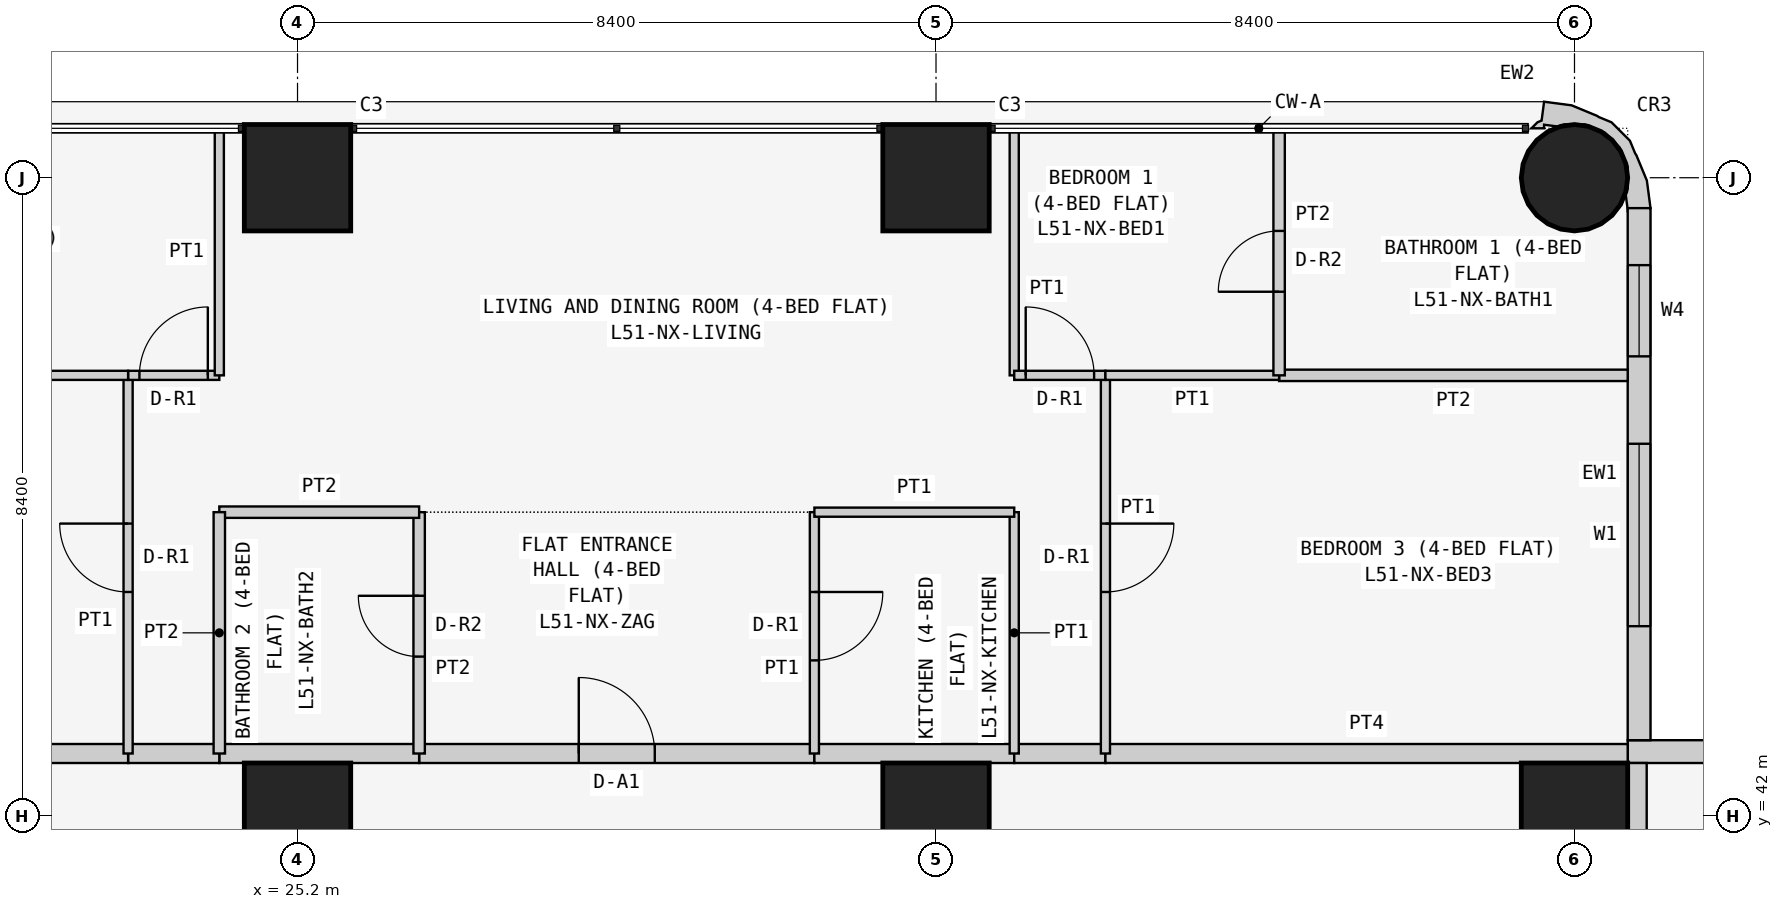
"""IFC4 building model, lengths in metres.
Left out: names, types, materials, properties, quantities, classifications, styles, units other than length and angle.
Written with IfcOpenShell. Run it as: python <this file> out.ifc"""

import sys

from ifc_helpers import new_model, si_unit, direction, frame, frame_2d, origin, origin_2d, place, context, subcontext, project, spatial, polyline, rectangle, circle, outline, extrude, element, fill, save


model = new_model("IFC4")
c1 = context("Model", 3, precision=1e-05, world=origin(), true_north=direction((0.0, 1.0)))
c2 = subcontext(c1, "Body", "Model", "MODEL_VIEW")
j1 = project(units=[si_unit("LENGTHUNIT", "METRE"), si_unit("PLANEANGLEUNIT", "RADIAN")], contexts=[c1])
p1 = place(None, origin())
s1 = spatial("IfcSite", under=j1, at=p1, CompositionType="ELEMENT")
p2 = place(p1, origin())
s2 = spatial("IfcBuilding", under=s1, at=p2, CompositionType="ELEMENT")
p3 = place(p2, frame((0.0, 0.0, 197.7)))
s3 = spatial("IfcBuildingStorey", under=s2, at=p3, CompositionType="ELEMENT", Elevation=197.7)
for number, where, z_axis, x_axis in (
    (1, (25.2, 42.0, 0.0), (0.0, 0.0, 1.0), (1.0, 0.0, 0.0)),
    (2, (25.2, 50.4, 0.0), (0.0, 0.0, 1.0), (1.0, 0.0, 0.0)),
    (3, (33.6, 42.0, 0.0), (0.0, 0.0, 1.0), (1.0, 0.0, 0.0)),
    (4, (33.6, 50.4, 0.0), (0.0, 0.0, 1.0), (1.0, 0.0, 0.0)),
    (5, (42.0, 42.0, 0.0), (0.0, 0.0, 1.0), (1.0, 0.0, 0.0)),
):
    element("IfcColumn", number, at=place(p3, frame(where, z_axis=z_axis, x_axis=x_axis)), inside=s3, PredefinedType="COLUMN", context=c2, shape_type="SweptSolid", body=[
        extrude(rectangle(XDim=1.4, YDim=1.4, at=origin_2d()), origin(), (0.0, 0.0, 1.0), 3.6),
    ])
p4 = place(p3, frame((42.0, 50.4, 0.0), z_axis=(0.0, 0.0, 1.0), x_axis=(1.0, 0.0, 0.0)))
e6 = element("IfcColumn", 6, at=p4, inside=s3, PredefinedType="COLUMN", context=c2, shape_type="SweptSolid", body=[
    extrude(circle(Radius=0.7, at=origin_2d()), origin(), (0.0, 0.0, 1.0), 3.6),
])
p5 = place(p3, frame((50.0, 42.85, 0.0), z_axis=(0.0, 0.0, 1.0), x_axis=(-1.0, 0.0, 0.0)))
e7 = element("IfcWall", 7, at=p5, inside=s3, PredefinedType="SOLIDWALL", context=c2, shape_type="SweptSolid", body=[
    extrude(rectangle(XDim=7.3, YDim=0.3, at=frame_2d((3.65, 0.0))), origin(), (0.0, 0.0, 1.0), 3.45),
])
p6 = place(p5, frame((3.1, 0.0, 0.9)))
e8 = element("IfcOpeningElement", 8, at=p6, cuts=e7, PredefinedType="OPENING", context=c2, shape_type="SweptSolid", body=[
    extrude(rectangle(XDim=2.4, YDim=1.5, at=frame_2d((1.2, 0.75))), frame((0.0, 0.16, 0.0), z_axis=(0.0, -1.0, 0.0), x_axis=(1.0, 0.0, 0.0)), (0.0, 0.0, 1.0), 0.32),
])
p7 = place(p5, frame((0.75, 0.0, 0.9)))
e9 = element("IfcOpeningElement", 9, at=p7, cuts=e7, PredefinedType="OPENING", context=c2, shape_type="SweptSolid", body=[
    extrude(rectangle(XDim=1.2, YDim=1.5, at=frame_2d((0.6, 0.75))), frame((0.0, 0.16, 0.0), z_axis=(0.0, -1.0, 0.0), x_axis=(1.0, 0.0, 0.0)), (0.0, 0.0, 1.0), 0.32),
])
p8 = place(p3, frame((42.85, 43.0, 0.0), z_axis=(0.0, 0.0, 1.0), x_axis=(0.0, 1.0, 0.0)))
e10 = element("IfcWall", 10, at=p8, inside=s3, PredefinedType="SOLIDWALL", context=c2, shape_type="SweptSolid", body=[
    extrude(rectangle(XDim=7.0, YDim=0.3, at=frame_2d((3.5, 0.0))), origin(), (0.0, 0.0, 1.0), 3.45),
])
p9 = place(p8, frame((1.5, 0.0, 0.9)))
e11 = element("IfcOpeningElement", 11, at=p9, cuts=e10, PredefinedType="OPENING", context=c2, shape_type="SweptSolid", body=[
    extrude(rectangle(XDim=2.4, YDim=1.5, at=frame_2d((1.2, 0.75))), frame((0.0, 0.16, 0.0), z_axis=(0.0, -1.0, 0.0), x_axis=(1.0, 0.0, 0.0)), (0.0, 0.0, 1.0), 0.32),
])
p10 = place(p8, frame((5.05, 0.0, 0.9)))
e12 = element("IfcOpeningElement", 12, at=p10, cuts=e10, PredefinedType="OPENING", context=c2, shape_type="SweptSolid", body=[
    extrude(rectangle(XDim=1.2, YDim=1.5, at=frame_2d((0.6, 0.75))), frame((0.0, 0.16, 0.0), z_axis=(0.0, -1.0, 0.0), x_axis=(1.0, 0.0, 0.0)), (0.0, 0.0, 1.0), 0.32),
])
p11 = place(p3, frame((42.724, 50.11, 0.0), z_axis=(0.0, 0.0, 1.0), x_axis=(0.439933741929, 0.898030234854, 0.0)))
e13 = element("IfcWall", 13, at=p11, inside=s3, PredefinedType="SOLIDWALL", context=c2, shape_type="SweptSolid", body=[
    extrude(outline(polyline([(-0.145, -0.044), (0.022, -0.296), (0.327, -0.094), (0.568, 0.18), (0.577, 0.199), (0.7, 0.337), (0.811, 0.661), (0.799, 0.845), (0.803, 0.866), (0.78, 1.231), (0.664, 1.577), (0.426, 1.497), (0.382, 1.536), (0.276, 1.572), (0.349, 1.423), (0.392, 1.444), (0.453, 1.261), (0.51, 1.211), (0.632, 0.961), (0.65, 0.683), (0.56, 0.419), (0.375, 0.21), (0.125, 0.087), (0.05, 0.082), (-0.127, -0.035), (-0.145, -0.044)])), origin(), (0.0, 0.0, 1.0), 3.45),
])
p12 = place(p3, frame((26.8, 42.825, 0.0), z_axis=(0.0, 0.0, 1.0), x_axis=(1.0, 0.0, 0.0)))
e14 = element("IfcWall", 14, at=p12, inside=s3, PredefinedType="PARTITIONING", context=c2, shape_type="SweptSolid", body=[
    extrude(rectangle(XDim=5.2, YDim=0.25, at=frame_2d((2.6, 0.0))), origin(), (0.0, 0.0, 1.0), 3.45),
])
p13 = place(p12, frame((2.1, 0.0, 0.0)))
e15 = element("IfcOpeningElement", 15, at=p13, cuts=e14, PredefinedType="OPENING", context=c2, shape_type="SweptSolid", body=[
    extrude(rectangle(XDim=1.0, YDim=2.1, at=frame_2d((0.5, 1.05))), frame((0.0, 0.135, 0.0), z_axis=(0.0, -1.0, 0.0), x_axis=(1.0, 0.0, 0.0)), (0.0, 0.0, 1.0), 0.27),
])
p14 = place(p3, frame((24.171, 42.825, 0.0), z_axis=(0.0, 0.0, 1.0), x_axis=(1.0, 0.0, 0.0)))
e16 = element("IfcWall", 16, at=p14, inside=s3, PredefinedType="PARTITIONING", context=c2, shape_type="SweptSolid", body=[
    extrude(rectangle(XDim=2.629, YDim=0.25, at=frame_2d((1.314, 0.0))), origin(), (0.0, 0.0, 1.0), 3.45),
])
p15 = place(p3, frame((32.0, 42.825, 0.0), z_axis=(0.0, 0.0, 1.0), x_axis=(1.0, 0.0, 0.0)))
e17 = element("IfcWall", 17, at=p15, inside=s3, PredefinedType="PARTITIONING", context=c2, shape_type="SweptSolid", body=[
    extrude(rectangle(XDim=2.629, YDim=0.25, at=frame_2d((1.314, 0.0))), origin(), (0.0, 0.0, 1.0), 3.45),
])
p16 = place(p3, frame((22.971, 42.825, 0.0), z_axis=(0.0, 0.0, 1.0), x_axis=(1.0, 0.0, 0.0)))
e18 = element("IfcWall", 18, at=p16, inside=s3, PredefinedType="PARTITIONING", context=c2, shape_type="SweptSolid", body=[
    extrude(rectangle(XDim=1.2, YDim=0.25, at=frame_2d((0.6, 0.0))), origin(), (0.0, 0.0, 1.0), 3.45),
])
p17 = place(p3, frame((34.629, 42.825, 0.0), z_axis=(0.0, 0.0, 1.0), x_axis=(1.0, 0.0, 0.0)))
e19 = element("IfcWall", 19, at=p17, inside=s3, PredefinedType="PARTITIONING", context=c2, shape_type="SweptSolid", body=[
    extrude(rectangle(XDim=1.2, YDim=0.25, at=frame_2d((0.6, 0.0))), origin(), (0.0, 0.0, 1.0), 3.45),
])
for number, where, z_axis, x_axis in (
    (20, (16.1, 42.825, 0.0), (0.0, 0.0, 1.0), (1.0, 0.0, 0.0)),
    (21, (35.829, 42.825, 0.0), (0.0, 0.0, 1.0), (1.0, 0.0, 0.0)),
    (22, (42.825, 42.7, 0.0), (0.0, 0.0, 1.0), (0.0, -1.0, 0.0)),
):
    element("IfcWall", number, at=place(p3, frame(where, z_axis=z_axis, x_axis=x_axis)), inside=s3, PredefinedType="PARTITIONING", context=c2, shape_type="SweptSolid", body=[
        extrude(rectangle(XDim=6.871, YDim=0.25, at=frame_2d((3.436, 0.0))), origin(), (0.0, 0.0, 1.0), 3.45),
    ])
p18 = place(p3, frame((26.8, 46.0, 0.0), z_axis=(0.0, 0.0, 1.0), x_axis=(0.0, -1.0, 0.0)))
e23 = element("IfcWall", 23, at=p18, inside=s3, PredefinedType="PARTITIONING", context=c2, shape_type="SweptSolid", body=[
    extrude(rectangle(XDim=3.175, YDim=0.15, at=frame_2d((1.587, 0.0))), origin(), (0.0, 0.0, 1.0), 3.45),
])
p19 = place(p18, frame((1.1, 0.0, 0.0)))
e24 = element("IfcOpeningElement", 24, at=p19, cuts=e23, PredefinedType="OPENING", context=c2, shape_type="SweptSolid", body=[
    extrude(rectangle(XDim=0.8, YDim=2.1, at=frame_2d((0.4, 1.05))), frame((0.0, 0.085, 0.0), z_axis=(0.0, -1.0, 0.0), x_axis=(1.0, 0.0, 0.0)), (0.0, 0.0, 1.0), 0.17),
])
p20 = place(p3, frame((32.0, 42.825, 0.0), z_axis=(0.0, 0.0, 1.0), x_axis=(0.0, 1.0, 0.0)))
e25 = element("IfcWall", 25, at=p20, inside=s3, PredefinedType="PARTITIONING", context=c2, shape_type="SweptSolid", body=[
    extrude(rectangle(XDim=3.175, YDim=0.12, at=frame_2d((1.587, 0.0))), origin(), (0.0, 0.0, 1.0), 3.45),
])
p21 = place(p20, frame((1.225, 0.0, 0.0)))
e26 = element("IfcOpeningElement", 26, at=p21, cuts=e25, PredefinedType="OPENING", context=c2, shape_type="SweptSolid", body=[
    extrude(rectangle(XDim=0.9, YDim=2.1, at=frame_2d((0.45, 1.05))), frame((0.0, 0.07, 0.0), z_axis=(0.0, -1.0, 0.0), x_axis=(1.0, 0.0, 0.0)), (0.0, 0.0, 1.0), 0.14),
])
p22 = place(p3, frame((26.8, 46.0, 0.0), z_axis=(0.0, 0.0, 1.0), x_axis=(-1.0, 0.0, 0.0)))
e27 = element("IfcWall", 27, at=p22, inside=s3, PredefinedType="PARTITIONING", context=c2, shape_type="SweptSolid", body=[
    extrude(rectangle(XDim=2.629, YDim=0.15, at=frame_2d((1.314, 0.0))), origin(), (0.0, 0.0, 1.0), 3.45),
])
p23 = place(p3, frame((24.171, 46.0, 0.0), z_axis=(0.0, 0.0, 1.0), x_axis=(0.0, -1.0, 0.0)))
e28 = element("IfcWall", 28, at=p23, inside=s3, PredefinedType="PARTITIONING", context=c2, shape_type="SweptSolid", body=[
    extrude(rectangle(XDim=3.175, YDim=0.15, at=frame_2d((1.587, 0.0))), origin(), (0.0, 0.0, 1.0), 3.45),
])
p24 = place(p3, frame((34.629, 42.825, 0.0), z_axis=(0.0, 0.0, 1.0), x_axis=(0.0, 1.0, 0.0)))
e29 = element("IfcWall", 29, at=p24, inside=s3, PredefinedType="PARTITIONING", context=c2, shape_type="SweptSolid", body=[
    extrude(rectangle(XDim=3.175, YDim=0.12, at=frame_2d((1.587, 0.0))), origin(), (0.0, 0.0, 1.0), 3.45),
])
p25 = place(p3, frame((34.629, 46.0, 0.0), z_axis=(0.0, 0.0, 1.0), x_axis=(-1.0, 0.0, 0.0)))
e30 = element("IfcWall", 30, at=p25, inside=s3, PredefinedType="PARTITIONING", context=c2, shape_type="SweptSolid", body=[
    extrude(rectangle(XDim=2.629, YDim=0.12, at=frame_2d((1.314, 0.0))), origin(), (0.0, 0.0, 1.0), 3.45),
])
p26 = place(p3, frame((22.971, 42.825, 0.0), z_axis=(0.0, 0.0, 1.0), x_axis=(0.0, 1.0, 0.0)))
e31 = element("IfcWall", 31, at=p26, inside=s3, PredefinedType="PARTITIONING", context=c2, shape_type="SweptSolid", body=[
    extrude(rectangle(XDim=4.975, YDim=0.12, at=frame_2d((2.488, 0.0))), origin(), (0.0, 0.0, 1.0), 3.45),
])
p27 = place(p26, frame((2.125, 0.0, 0.0)))
e32 = element("IfcOpeningElement", 32, at=p27, cuts=e31, PredefinedType="OPENING", context=c2, shape_type="SweptSolid", body=[
    extrude(rectangle(XDim=0.9, YDim=2.1, at=frame_2d((0.45, 1.05))), frame((0.0, 0.07, 0.0), z_axis=(0.0, -1.0, 0.0), x_axis=(1.0, 0.0, 0.0)), (0.0, 0.0, 1.0), 0.14),
])
p28 = place(p3, frame((22.971, 47.8, 0.0), z_axis=(0.0, 0.0, 1.0), x_axis=(1.0, 0.0, 0.0)))
e33 = element("IfcWall", 33, at=p28, inside=s3, PredefinedType="PARTITIONING", context=c2, shape_type="SweptSolid", body=[
    extrude(rectangle(XDim=1.2, YDim=0.12, at=frame_2d((0.6, 0.0))), origin(), (0.0, 0.0, 1.0), 3.45),
])
p29 = place(p28, frame((0.149, 0.0, 0.0)))
e34 = element("IfcOpeningElement", 34, at=p29, cuts=e33, PredefinedType="OPENING", context=c2, shape_type="SweptSolid", body=[
    extrude(rectangle(XDim=0.9, YDim=2.1, at=frame_2d((0.45, 1.05))), frame((0.0, 0.07, 0.0), z_axis=(0.0, -1.0, 0.0), x_axis=(1.0, 0.0, 0.0)), (0.0, 0.0, 1.0), 0.14),
])
p30 = place(p3, frame((24.171, 47.8, 0.0), z_axis=(0.0, 0.0, 1.0), x_axis=(0.0, 1.0, 0.0)))
e35 = element("IfcWall", 35, at=p30, inside=s3, PredefinedType="PARTITIONING", context=c2, shape_type="SweptSolid", body=[
    extrude(rectangle(XDim=3.25, YDim=0.12, at=frame_2d((1.625, 0.0))), origin(), (0.0, 0.0, 1.0), 3.45),
])
p31 = place(p3, frame((35.829, 47.8, 0.0), z_axis=(0.0, 0.0, 1.0), x_axis=(0.0, -1.0, 0.0)))
e36 = element("IfcWall", 36, at=p31, inside=s3, PredefinedType="PARTITIONING", context=c2, shape_type="SweptSolid", body=[
    extrude(rectangle(XDim=4.975, YDim=0.12, at=frame_2d((2.488, 0.0))), origin(), (0.0, 0.0, 1.0), 3.45),
])
p32 = place(p31, frame((1.95, 0.0, 0.0)))
e37 = element("IfcOpeningElement", 37, at=p32, cuts=e36, PredefinedType="OPENING", context=c2, shape_type="SweptSolid", body=[
    extrude(rectangle(XDim=0.9, YDim=2.1, at=frame_2d((0.45, 1.05))), frame((0.0, 0.07, 0.0), z_axis=(0.0, -1.0, 0.0), x_axis=(1.0, 0.0, 0.0)), (0.0, 0.0, 1.0), 0.14),
])
p33 = place(p3, frame((34.629, 51.05, 0.0), z_axis=(0.0, 0.0, 1.0), x_axis=(0.0, -1.0, 0.0)))
e38 = element("IfcWall", 38, at=p33, inside=s3, PredefinedType="PARTITIONING", context=c2, shape_type="SweptSolid", body=[
    extrude(rectangle(XDim=3.25, YDim=0.12, at=frame_2d((1.625, 0.0))), origin(), (0.0, 0.0, 1.0), 3.45),
])
p34 = place(p3, frame((34.629, 47.8, 0.0), z_axis=(0.0, 0.0, 1.0), x_axis=(1.0, 0.0, 0.0)))
e39 = element("IfcWall", 39, at=p34, inside=s3, PredefinedType="PARTITIONING", context=c2, shape_type="SweptSolid", body=[
    extrude(rectangle(XDim=1.2, YDim=0.12, at=frame_2d((0.6, 0.0))), origin(), (0.0, 0.0, 1.0), 3.45),
])
p35 = place(p34, frame((0.151, 0.0, 0.0)))
e40 = element("IfcOpeningElement", 40, at=p35, cuts=e39, PredefinedType="OPENING", context=c2, shape_type="SweptSolid", body=[
    extrude(rectangle(XDim=0.9, YDim=2.1, at=frame_2d((0.45, 1.05))), frame((0.0, 0.07, 0.0), z_axis=(0.0, -1.0, 0.0), x_axis=(1.0, 0.0, 0.0)), (0.0, 0.0, 1.0), 0.14),
])
p36 = place(p3, frame((22.971, 47.8, 0.0), z_axis=(0.0, 0.0, 1.0), x_axis=(-1.0, 0.0, 0.0)))
e41 = element("IfcWall", 41, at=p36, inside=s3, PredefinedType="PARTITIONING", context=c2, shape_type="SweptSolid", body=[
    extrude(rectangle(XDim=6.871, YDim=0.12, at=frame_2d((3.436, 0.0))), origin(), (0.0, 0.0, 1.0), 3.45),
])
p37 = place(p3, frame((42.7, 47.8, 0.0), z_axis=(0.0, 0.0, 1.0), x_axis=(-1.0, 0.0, 0.0)))
e42 = element("IfcWall", 42, at=p37, inside=s3, PredefinedType="PARTITIONING", context=c2, shape_type="SweptSolid", body=[
    extrude(rectangle(XDim=4.586, YDim=0.15, at=frame_2d((2.293, 0.0))), origin(), (0.0, 0.0, 1.0), 3.45),
])
p38 = place(p3, frame((38.114, 47.8, 0.0), z_axis=(0.0, 0.0, 1.0), x_axis=(-1.0, 0.0, 0.0)))
e43 = element("IfcWall", 43, at=p38, inside=s3, PredefinedType="PARTITIONING", context=c2, shape_type="SweptSolid", body=[
    extrude(rectangle(XDim=2.285, YDim=0.12, at=frame_2d((1.143, 0.0))), origin(), (0.0, 0.0, 1.0), 3.45),
])
p39 = place(p3, frame((38.114, 51.05, 0.0), z_axis=(0.0, 0.0, 1.0), x_axis=(0.0, -1.0, 0.0)))
e44 = element("IfcWall", 44, at=p39, inside=s3, PredefinedType="PARTITIONING", context=c2, shape_type="SweptSolid", body=[
    extrude(rectangle(XDim=3.25, YDim=0.15, at=frame_2d((1.625, 0.0))), origin(), (0.0, 0.0, 1.0), 3.45),
])
p40 = place(p39, frame((1.35, 0.0, 0.0)))
e45 = element("IfcOpeningElement", 45, at=p40, cuts=e44, PredefinedType="OPENING", context=c2, shape_type="SweptSolid", body=[
    extrude(rectangle(XDim=0.8, YDim=2.1, at=frame_2d((0.4, 1.05))), frame((0.0, 0.085, 0.0), z_axis=(0.0, -1.0, 0.0), x_axis=(1.0, 0.0, 0.0)), (0.0, 0.0, 1.0), 0.17),
])
p41 = place(p9, origin())
e46 = element("IfcWindow", 46, at=p41, inside=s3, PartitioningType="SINGLE_PANEL", PredefinedType="WINDOW", context=c2, shape_type="SweptSolid", body=[
    extrude(rectangle(XDim=2.4, YDim=1.5, at=frame_2d((1.2, 0.75))), frame((0.0, 0.03, 0.0), z_axis=(0.0, -1.0, 0.0), x_axis=(1.0, 0.0, 0.0)), (0.0, 0.0, 1.0), 0.06),
])
fill(e11, e46)
p42 = place(p10, origin())
e47 = element("IfcWindow", 47, at=p42, inside=s3, PartitioningType="SINGLE_PANEL", PredefinedType="WINDOW", context=c2, shape_type="SweptSolid", body=[
    extrude(rectangle(XDim=1.2, YDim=1.5, at=frame_2d((0.6, 0.75))), frame((0.0, 0.03, 0.0), z_axis=(0.0, -1.0, 0.0), x_axis=(1.0, 0.0, 0.0)), (0.0, 0.0, 1.0), 0.06),
])
fill(e12, e47)
p43 = place(p13, origin())
e48 = element("IfcDoor", 48, at=p43, inside=s3, OperationType="SINGLE_SWING_LEFT", PredefinedType="DOOR", context=c2, shape_type="SweptSolid", body=[
    extrude(rectangle(XDim=1.0, YDim=2.1, at=frame_2d((0.5, 1.05))), frame((0.0, 0.025, 0.0), z_axis=(0.0, -1.0, 0.0), x_axis=(1.0, 0.0, 0.0)), (0.0, 0.0, 1.0), 0.05),
])
fill(e15, e48)
p44 = place(p19, frame((0.8, 0.0, 0.0), z_axis=(0.0, 0.0, 1.0), x_axis=(-1.0, 0.0, 0.0)))
e49 = element("IfcDoor", 49, at=p44, inside=s3, OperationType="SINGLE_SWING_RIGHT", PredefinedType="DOOR", context=c2, shape_type="SweptSolid", body=[
    extrude(rectangle(XDim=0.8, YDim=2.1, at=frame_2d((0.4, 1.05))), frame((0.0, 0.025, 0.0), z_axis=(0.0, -1.0, 0.0), x_axis=(1.0, 0.0, 0.0)), (0.0, 0.0, 1.0), 0.05),
])
fill(e24, e49)
p45 = place(p21, frame((0.9, 0.0, 0.0), z_axis=(0.0, 0.0, 1.0), x_axis=(-1.0, 0.0, 0.0)))
e50 = element("IfcDoor", 50, at=p45, inside=s3, OperationType="SINGLE_SWING_LEFT", PredefinedType="DOOR", context=c2, shape_type="SweptSolid", body=[
    extrude(rectangle(XDim=0.9, YDim=2.1, at=frame_2d((0.45, 1.05))), frame((0.0, 0.025, 0.0), z_axis=(0.0, -1.0, 0.0), x_axis=(1.0, 0.0, 0.0)), (0.0, 0.0, 1.0), 0.05),
])
fill(e26, e50)
p46 = place(p27, origin())
e51 = element("IfcDoor", 51, at=p46, inside=s3, OperationType="SINGLE_SWING_RIGHT", PredefinedType="DOOR", context=c2, shape_type="SweptSolid", body=[
    extrude(rectangle(XDim=0.9, YDim=2.1, at=frame_2d((0.45, 1.05))), frame((0.0, 0.025, 0.0), z_axis=(0.0, -1.0, 0.0), x_axis=(1.0, 0.0, 0.0)), (0.0, 0.0, 1.0), 0.05),
])
fill(e32, e51)
p47 = place(p29, origin())
e52 = element("IfcDoor", 52, at=p47, inside=s3, OperationType="SINGLE_SWING_RIGHT", PredefinedType="DOOR", context=c2, shape_type="SweptSolid", body=[
    extrude(rectangle(XDim=0.9, YDim=2.1, at=frame_2d((0.45, 1.05))), frame((0.0, 0.025, 0.0), z_axis=(0.0, -1.0, 0.0), x_axis=(1.0, 0.0, 0.0)), (0.0, 0.0, 1.0), 0.05),
])
fill(e34, e52)
p48 = place(p32, origin())
e53 = element("IfcDoor", 53, at=p48, inside=s3, OperationType="SINGLE_SWING_LEFT", PredefinedType="DOOR", context=c2, shape_type="SweptSolid", body=[
    extrude(rectangle(XDim=0.9, YDim=2.1, at=frame_2d((0.45, 1.05))), frame((0.0, 0.025, 0.0), z_axis=(0.0, -1.0, 0.0), x_axis=(1.0, 0.0, 0.0)), (0.0, 0.0, 1.0), 0.05),
])
fill(e37, e53)
p49 = place(p35, origin())
e54 = element("IfcDoor", 54, at=p49, inside=s3, OperationType="SINGLE_SWING_LEFT", PredefinedType="DOOR", context=c2, shape_type="SweptSolid", body=[
    extrude(rectangle(XDim=0.9, YDim=2.1, at=frame_2d((0.45, 1.05))), frame((0.0, 0.025, 0.0), z_axis=(0.0, -1.0, 0.0), x_axis=(1.0, 0.0, 0.0)), (0.0, 0.0, 1.0), 0.05),
])
fill(e40, e54)
p50 = place(p40, frame((0.8, 0.0, 0.0), z_axis=(0.0, 0.0, 1.0), x_axis=(-1.0, 0.0, 0.0)))
e55 = element("IfcDoor", 55, at=p50, inside=s3, OperationType="SINGLE_SWING_LEFT", PredefinedType="DOOR", context=c2, shape_type="SweptSolid", body=[
    extrude(rectangle(XDim=0.8, YDim=2.1, at=frame_2d((0.4, 1.05))), frame((0.0, 0.025, 0.0), z_axis=(0.0, -1.0, 0.0), x_axis=(1.0, 0.0, 0.0)), (0.0, 0.0, 1.0), 0.05),
])
fill(e45, e55)
save(model, sys.argv[1])
